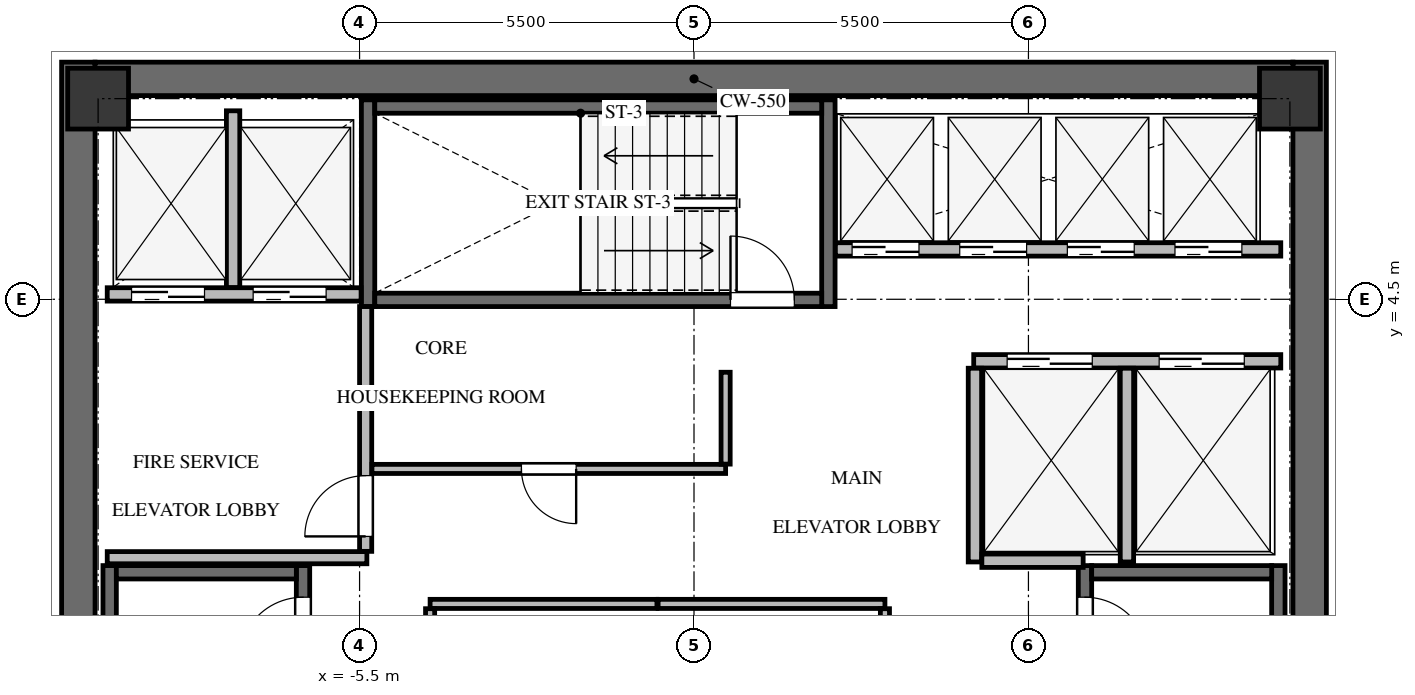
"""IFC4 building model, lengths in metres.
Left out: names, types, materials, properties, quantities, classifications, styles, units other than length and angle.
Written with IfcOpenShell. Run it as: python <this file> out.ifc"""

import sys

from ifc_helpers import new_model, si_unit, direction, frame, frame_2d, origin, origin_2d, place, context, subcontext, project, spatial, rectangle, extrude, source, transform, mapped, element, fill, save


model = new_model("IFC4")
c1 = context("Model", 3, precision=1e-05, world=origin(), true_north=direction((0.0, 1.0)))
c2 = subcontext(c1, "Body", "Model", "MODEL_VIEW")
j1 = project(units=[si_unit("LENGTHUNIT", "METRE"), si_unit("PLANEANGLEUNIT", "RADIAN")], contexts=[c1])
p1 = place(None, origin())
s1 = spatial("IfcSite", under=j1, at=p1, CompositionType="ELEMENT")
p2 = place(p1, origin())
s2 = spatial("IfcBuilding", under=s1, at=p2, CompositionType="ELEMENT")
p3 = place(p2, frame((0.0, 0.0, 224.9)))
s3 = spatial("IfcBuildingStorey", under=s2, at=p3, CompositionType="ELEMENT", Elevation=224.9)
for number, where, z_axis, x_axis in (
    (1, (-10.125, -8.4, 0.0), (0.0, 0.0, 1.0), (0.0, 1.0, 0.0)),
    (2, (10.125, -8.4, 0.0), (0.0, 0.0, 1.0), (0.0, 1.0, 0.0)),
):
    element("IfcWall", number, at=place(p3, frame(where, z_axis=z_axis, x_axis=x_axis)), inside=s3, PredefinedType="SHEAR", context=c2, shape_type="SweptSolid", body=[
        extrude(rectangle(XDim=16.8, YDim=0.55, at=frame_2d((8.4, 0.0))), origin(), (0.0, 0.0, 1.0), 3.3),
    ])
p4 = place(p3, frame((-9.85, 8.125, 0.0), z_axis=(0.0, 0.0, 1.0), x_axis=(1.0, 0.0, 0.0)))
e3 = element("IfcWall", 3, at=p4, inside=s3, PredefinedType="SHEAR", context=c2, shape_type="SweptSolid", body=[
    extrude(rectangle(XDim=19.7, YDim=0.55, at=frame_2d((9.85, 0.0))), origin(), (0.0, 0.0, 1.0), 3.3),
])
p5 = place(p3, frame((-6.43, -7.77, -0.24), z_axis=(0.0, 0.0, 1.0), x_axis=(0.0, 1.0, 0.0)))
e4 = element("IfcWall", 4, at=p5, inside=s3, PredefinedType="SHEAR", context=c2, shape_type="SweptSolid", body=[
    extrude(rectangle(XDim=7.89, YDim=0.22, at=frame_2d((3.945, 0.0))), origin(), (0.0, 0.0, 1.0), 3.3),
])
p6 = place(p5, frame((6.32, 0.0, 0.0)))
e5 = element("IfcOpeningElement", 5, at=p6, cuts=e4, PredefinedType="OPENING", context=c2, shape_type="SweptSolid", body=[
    extrude(rectangle(XDim=1.05, YDim=2.15, at=frame_2d((0.525, 1.075))), frame((0.0, 0.12, 0.0), z_axis=(0.0, -1.0, 0.0), x_axis=(1.0, 0.0, 0.0)), (0.0, 0.0, 1.0), 0.24),
])
p7 = place(p3, frame((-9.61, 0.12, -0.24), z_axis=(0.0, 0.0, 1.0), x_axis=(0.0, -1.0, 0.0)))
e6 = element("IfcWall", 6, at=p7, inside=s3, PredefinedType="SHEAR", context=c2, shape_type="SweptSolid", body=[
    extrude(rectangle(XDim=7.89, YDim=0.22, at=frame_2d((3.945, 0.0))), origin(), (0.0, 0.0, 1.0), 3.3),
])
p8 = place(p3, frame((-6.54, 0.01, -0.24), z_axis=(0.0, 0.0, 1.0), x_axis=(-1.0, 0.0, 0.0)))
e7 = element("IfcWall", 7, at=p8, inside=s3, PredefinedType="SHEAR", context=c2, shape_type="SweptSolid", body=[
    extrude(rectangle(XDim=2.96, YDim=0.22, at=frame_2d((1.48, 0.0))), origin(), (0.0, 0.0, 1.0), 3.3),
])
p9 = place(p3, frame((9.61, -7.77, -0.24), z_axis=(0.0, 0.0, 1.0), x_axis=(0.0, 1.0, 0.0)))
e8 = element("IfcWall", 8, at=p9, inside=s3, PredefinedType="SHEAR", context=c2, shape_type="SweptSolid", body=[
    extrude(rectangle(XDim=7.89, YDim=0.22, at=frame_2d((3.945, 0.0))), origin(), (0.0, 0.0, 1.0), 3.3),
])
p10 = place(p3, frame((6.43, 0.12, -0.24), z_axis=(0.0, 0.0, 1.0), x_axis=(0.0, -1.0, 0.0)))
e9 = element("IfcWall", 9, at=p10, inside=s3, PredefinedType="SHEAR", context=c2, shape_type="SweptSolid", body=[
    extrude(rectangle(XDim=7.89, YDim=0.22, at=frame_2d((3.945, 0.0))), origin(), (0.0, 0.0, 1.0), 3.3),
])
p11 = place(p10, frame((0.52, 0.0, 0.0)))
e10 = element("IfcOpeningElement", 10, at=p11, cuts=e9, PredefinedType="OPENING", context=c2, shape_type="SweptSolid", body=[
    extrude(rectangle(XDim=1.05, YDim=2.15, at=frame_2d((0.525, 1.075))), frame((0.0, 0.12, 0.0), z_axis=(0.0, -1.0, 0.0), x_axis=(1.0, 0.0, 0.0)), (0.0, 0.0, 1.0), 0.24),
])
p12 = place(p3, frame((9.5, 0.01, -0.24), z_axis=(0.0, 0.0, 1.0), x_axis=(-1.0, 0.0, 0.0)))
e11 = element("IfcWall", 11, at=p12, inside=s3, PredefinedType="SHEAR", context=c2, shape_type="SweptSolid", body=[
    extrude(rectangle(XDim=2.96, YDim=0.22, at=frame_2d((1.48, 0.0))), origin(), (0.0, 0.0, 1.0), 3.3),
])
for number, where, z_axis, x_axis in (
    (12, (2.21, 4.38, -0.24), (0.0, 0.0, 1.0), (0.0, 1.0, 0.0)),
    (13, (-5.36, 7.78, -0.24), (0.0, 0.0, 1.0), (0.0, -1.0, 0.0)),
):
    element("IfcWall", number, at=place(p3, frame(where, z_axis=z_axis, x_axis=x_axis)), inside=s3, PredefinedType="SHEAR", context=c2, shape_type="SweptSolid", body=[
        extrude(rectangle(XDim=3.4, YDim=0.22, at=frame_2d((1.7, 0.0))), origin(), (0.0, 0.0, 1.0), 3.3),
    ])
p13 = place(p3, frame((-5.25, 4.49, -0.24), z_axis=(0.0, 0.0, 1.0), x_axis=(1.0, 0.0, 0.0)))
e14 = element("IfcWall", 14, at=p13, inside=s3, PredefinedType="SHEAR", context=c2, shape_type="SweptSolid", body=[
    extrude(rectangle(XDim=7.35, YDim=0.22, at=frame_2d((3.675, 0.0))), origin(), (0.0, 0.0, 1.0), 3.3),
])
p14 = place(p13, frame((5.85, 0.0, 0.0)))
e15 = element("IfcOpeningElement", 15, at=p14, cuts=e14, PredefinedType="OPENING", context=c2, shape_type="SweptSolid", body=[
    extrude(rectangle(XDim=1.05, YDim=2.15, at=frame_2d((0.525, 1.075))), frame((0.0, 0.12, 0.0), z_axis=(0.0, -1.0, 0.0), x_axis=(1.0, 0.0, 0.0)), (0.0, 0.0, 1.0), 0.24),
])
p15 = place(p3, frame((2.1, 7.67, -0.24), z_axis=(0.0, 0.0, 1.0), x_axis=(-1.0, 0.0, 0.0)))
e16 = element("IfcWall", 16, at=p15, inside=s3, PredefinedType="SHEAR", context=c2, shape_type="SweptSolid", body=[
    extrude(rectangle(XDim=7.35, YDim=0.22, at=frame_2d((3.675, 0.0))), origin(), (0.0, 0.0, 1.0), 3.3),
])
m1 = source(origin(), c2, "Body", "SweptSolid", [
    extrude(rectangle(XDim=1.0, YDim=1.0, at=origin_2d()), origin(), (0.0, 0.0, 1.0), 3.3),
])
for number, where, z_axis, x_axis in (
    (17, (9.8, 7.8, -0.24), (0.0, 0.0, 1.0), (1.0, 0.0, 0.0)),
    (18, (-9.8, 7.8, -0.24), (0.0, 0.0, 1.0), (1.0, 0.0, 0.0)),
):
    element("IfcColumn", number, at=place(p3, frame(where, z_axis=z_axis, x_axis=x_axis)), inside=s3, PredefinedType="COLUMN", context=c2, shape_type="MappedRepresentation", body=[
        mapped(m1, transform((0.0, 0.0, 0.0), x_axis=(1.0, 0.0, 0.0), y_axis=(0.0, 1.0, 0.0), z_axis=(0.0, 0.0, 1.0), scale=1.0)),
    ])
p16 = place(p3, frame((-9.65, 4.58, 0.0), z_axis=(0.0, 0.0, 1.0), x_axis=(1.0, 0.0, 0.0)))
e19 = element("IfcWall", 19, at=p16, inside=s3, PredefinedType="SOLIDWALL", context=c2, shape_type="SweptSolid", body=[
    extrude(rectangle(XDim=4.175, YDim=0.22, at=frame_2d((2.087, 0.0))), origin(), (0.0, 0.0, 1.0), 3.045),
])
p17 = place(p16, frame((0.4, 0.0, 0.0)))
e20 = element("IfcOpeningElement", 20, at=p17, cuts=e19, PredefinedType="OPENING", context=c2, shape_type="SweptSolid", body=[
    extrude(rectangle(XDim=1.2, YDim=2.15, at=frame_2d((0.6, 1.075))), frame((0.0, 0.12, 0.0), z_axis=(0.0, -1.0, 0.0), x_axis=(1.0, 0.0, 0.0)), (0.0, 0.0, 1.0), 0.24),
])
p18 = place(p16, frame((2.4, 0.0, 0.0)))
e21 = element("IfcOpeningElement", 21, at=p18, cuts=e19, PredefinedType="OPENING", context=c2, shape_type="SweptSolid", body=[
    extrude(rectangle(XDim=1.2, YDim=2.15, at=frame_2d((0.6, 1.075))), frame((0.0, 0.12, 0.0), z_axis=(0.0, -1.0, 0.0), x_axis=(1.0, 0.0, 0.0)), (0.0, 0.0, 1.0), 0.24),
])
p19 = place(p3, frame((-7.58, 4.694, 0.0), z_axis=(0.0, 0.0, 1.0), x_axis=(0.0, 1.0, 0.0)))
e22 = element("IfcWall", 22, at=p19, inside=s3, PredefinedType="SOLIDWALL", context=c2, shape_type="SweptSolid", body=[
    extrude(rectangle(XDim=2.906, YDim=0.22, at=frame_2d((1.453, 0.0))), origin(), (0.0, 0.0, 1.0), 3.045),
])
p20 = place(p3, frame((-9.65, 0.25, 0.0), z_axis=(0.0, 0.0, 1.0), x_axis=(1.0, 0.0, 0.0)))
e23 = element("IfcWall", 23, at=p20, inside=s3, PredefinedType="SOLIDWALL", context=c2, shape_type="SweptSolid", body=[
    extrude(rectangle(XDim=4.27, YDim=0.2, at=frame_2d((2.135, 0.0))), origin(), (0.0, 0.0, 1.0), 3.045),
])
p21 = place(p3, frame((-5.4, 0.354, 0.0), z_axis=(0.0, 0.0, 1.0), x_axis=(0.0, 1.0, 0.0)))
e24 = element("IfcWall", 24, at=p21, inside=s3, PredefinedType="SOLIDWALL", context=c2, shape_type="SweptSolid", body=[
    extrude(rectangle(XDim=4.026, YDim=0.2, at=frame_2d((2.013, 0.0))), origin(), (0.0, 0.0, 1.0), 3.045),
])
p22 = place(p21, frame((0.246, 0.0, 0.0)))
e25 = element("IfcOpeningElement", 25, at=p22, cuts=e24, PredefinedType="OPENING", context=c2, shape_type="SweptSolid", body=[
    extrude(rectangle(XDim=1.0, YDim=2.15, at=frame_2d((0.5, 1.075))), frame((0.0, 0.11, 0.0), z_axis=(0.0, -1.0, 0.0), x_axis=(1.0, 0.0, 0.0)), (0.0, 0.0, 1.0), 0.22),
])
p23 = place(p3, frame((4.6, 3.48, 0.0), z_axis=(0.0, 0.0, 1.0), x_axis=(1.0, 0.0, 0.0)))
e26 = element("IfcWall", 26, at=p23, inside=s3, PredefinedType="SOLIDWALL", context=c2, shape_type="SweptSolid", body=[
    extrude(rectangle(XDim=5.05, YDim=0.22, at=frame_2d((2.525, 0.0))), origin(), (0.0, 0.0, 1.0), 3.045),
])
p24 = place(p23, frame((0.55, 0.0, 0.0)))
e27 = element("IfcOpeningElement", 27, at=p24, cuts=e26, PredefinedType="OPENING", context=c2, shape_type="SweptSolid", body=[
    extrude(rectangle(XDim=1.4, YDim=2.15, at=frame_2d((0.7, 1.075))), frame((0.0, 0.12, 0.0), z_axis=(0.0, -1.0, 0.0), x_axis=(1.0, 0.0, 0.0)), (0.0, 0.0, 1.0), 0.24),
])
p25 = place(p23, frame((3.05, 0.0, 0.0)))
e28 = element("IfcOpeningElement", 28, at=p25, cuts=e26, PredefinedType="OPENING", context=c2, shape_type="SweptSolid", body=[
    extrude(rectangle(XDim=1.4, YDim=2.15, at=frame_2d((0.7, 1.075))), frame((0.0, 0.12, 0.0), z_axis=(0.0, -1.0, 0.0), x_axis=(1.0, 0.0, 0.0)), (0.0, 0.0, 1.0), 0.24),
])
for number, where, z_axis, x_axis in (
    (29, (4.62, 0.18, 0.0), (0.0, 0.0, 1.0), (0.0, 1.0, 0.0)),
    (30, (7.12, 0.18, 0.0), (0.0, 0.0, 1.0), (0.0, 1.0, 0.0)),
):
    element("IfcWall", number, at=place(p3, frame(where, z_axis=z_axis, x_axis=x_axis)), inside=s3, PredefinedType="SOLIDWALL", context=c2, shape_type="SweptSolid", body=[
        extrude(rectangle(XDim=3.186, YDim=0.22, at=frame_2d((1.593, 0.0))), origin(), (0.0, 0.0, 1.0), 3.045),
    ])
p26 = place(p3, frame((4.734, 0.2, 0.0), z_axis=(0.0, 0.0, 1.0), x_axis=(1.0, 0.0, 0.0)))
e31 = element("IfcWall", 31, at=p26, inside=s3, PredefinedType="SOLIDWALL", context=c2, shape_type="SweptSolid", body=[
    extrude(rectangle(XDim=1.666, YDim=0.22, at=frame_2d((0.833, 0.0))), origin(), (0.0, 0.0, 1.0), 3.045),
])
p27 = place(p3, frame((2.325, 5.32, 0.0), z_axis=(0.0, 0.0, 1.0), x_axis=(1.0, 0.0, 0.0)))
e32 = element("IfcWall", 32, at=p27, inside=s3, PredefinedType="SOLIDWALL", context=c2, shape_type="SweptSolid", body=[
    extrude(rectangle(XDim=7.325, YDim=0.22, at=frame_2d((3.663, 0.0))), origin(), (0.0, 0.0, 1.0), 3.045),
])
p28 = place(p27, frame((0.275, 0.0, 0.0)))
e33 = element("IfcOpeningElement", 33, at=p28, cuts=e32, PredefinedType="OPENING", context=c2, shape_type="SweptSolid", body=[
    extrude(rectangle(XDim=1.1, YDim=2.15, at=frame_2d((0.55, 1.075))), frame((0.0, 0.12, 0.0), z_axis=(0.0, -1.0, 0.0), x_axis=(1.0, 0.0, 0.0)), (0.0, 0.0, 1.0), 0.24),
])
p29 = place(p27, frame((2.045, 0.0, 0.0)))
e34 = element("IfcOpeningElement", 34, at=p29, cuts=e32, PredefinedType="OPENING", context=c2, shape_type="SweptSolid", body=[
    extrude(rectangle(XDim=1.1, YDim=2.15, at=frame_2d((0.55, 1.075))), frame((0.0, 0.12, 0.0), z_axis=(0.0, -1.0, 0.0), x_axis=(1.0, 0.0, 0.0)), (0.0, 0.0, 1.0), 0.24),
])
p30 = place(p27, frame((3.815, 0.0, 0.0)))
e35 = element("IfcOpeningElement", 35, at=p30, cuts=e32, PredefinedType="OPENING", context=c2, shape_type="SweptSolid", body=[
    extrude(rectangle(XDim=1.1, YDim=2.15, at=frame_2d((0.55, 1.075))), frame((0.0, 0.12, 0.0), z_axis=(0.0, -1.0, 0.0), x_axis=(1.0, 0.0, 0.0)), (0.0, 0.0, 1.0), 0.24),
])
p31 = place(p27, frame((5.585, 0.0, 0.0)))
e36 = element("IfcOpeningElement", 36, at=p31, cuts=e32, PredefinedType="OPENING", context=c2, shape_type="SweptSolid", body=[
    extrude(rectangle(XDim=1.1, YDim=2.15, at=frame_2d((0.55, 1.075))), frame((0.0, 0.12, 0.0), z_axis=(0.0, -1.0, 0.0), x_axis=(1.0, 0.0, 0.0)), (0.0, 0.0, 1.0), 0.24),
])
p32 = place(p3, frame((-4.34, -0.51, 0.0), z_axis=(0.0, 0.0, 1.0), x_axis=(1.0, 0.0, 0.0)))
e37 = element("IfcWall", 37, at=p32, inside=s3, PredefinedType="PARTITIONING", context=c2, shape_type="SweptSolid", body=[
    extrude(rectangle(XDim=3.73, YDim=0.15, at=frame_2d((1.865, 0.0))), origin(), (0.0, 0.0, 1.0), 3.045),
])
p33 = place(p3, frame((-4.34, -2.961, 0.0), z_axis=(0.0, 0.0, 1.0), x_axis=(0.0, 1.0, 0.0)))
e38 = element("IfcWall", 38, at=p33, inside=s3, PredefinedType="PARTITIONING", context=c2, shape_type="SweptSolid", body=[
    extrude(rectangle(XDim=2.372, YDim=0.15, at=frame_2d((1.186, 0.0))), origin(), (0.0, 0.0, 1.0), 3.045),
])
p34 = place(p3, frame((-0.59, -0.51, 0.0), z_axis=(0.0, 0.0, 1.0), x_axis=(1.0, 0.0, 0.0)))
e39 = element("IfcWall", 39, at=p34, inside=s3, PredefinedType="PARTITIONING", context=c2, shape_type="SweptSolid", body=[
    extrude(rectangle(XDim=3.73, YDim=0.15, at=frame_2d((1.865, 0.0))), origin(), (0.0, 0.0, 1.0), 3.045),
])
p35 = place(p3, frame((3.14, -0.589, 0.0), z_axis=(0.0, 0.0, 1.0), x_axis=(0.0, -1.0, 0.0)))
e40 = element("IfcWall", 40, at=p35, inside=s3, PredefinedType="PARTITIONING", context=c2, shape_type="SweptSolid", body=[
    extrude(rectangle(XDim=2.372, YDim=0.15, at=frame_2d((1.186, 0.0))), origin(), (0.0, 0.0, 1.0), 3.045),
])
p36 = place(p3, frame((0.52, 1.71, 0.0), z_axis=(0.0, 0.0, 1.0), x_axis=(-1.0, 0.0, 0.0)))
e41 = element("IfcWall", 41, at=p36, inside=s3, PredefinedType="PARTITIONING", context=c2, shape_type="SweptSolid", body=[
    extrude(rectangle(XDim=5.816, YDim=0.15, at=frame_2d((2.908, 0.0))), origin(), (0.0, 0.0, 1.0), 3.045),
])
p37 = place(p36, frame((2.458, 0.0, 0.0)))
e42 = element("IfcOpeningElement", 42, at=p37, cuts=e41, PredefinedType="OPENING", context=c2, shape_type="SweptSolid", body=[
    extrude(rectangle(XDim=0.9, YDim=2.05, at=frame_2d((0.45, 1.025))), frame((0.0, 0.085, 0.0), z_axis=(0.0, -1.0, 0.0), x_axis=(1.0, 0.0, 0.0)), (0.0, 0.0, 1.0), 0.17),
])
p38 = place(p3, frame((0.52, 3.3, 0.0), z_axis=(0.0, 0.0, 1.0), x_axis=(0.0, -1.0, 0.0)))
e43 = element("IfcWall", 43, at=p38, inside=s3, PredefinedType="PARTITIONING", context=c2, shape_type="SweptSolid", body=[
    extrude(rectangle(XDim=1.511, YDim=0.15, at=frame_2d((0.755, 0.0))), origin(), (0.0, 0.0, 1.0), 3.045),
])
m2 = source(origin(), c2, "Body", "SweptSolid", [
    extrude(rectangle(XDim=1.05, YDim=2.15, at=frame_2d((0.525, 1.075))), frame((0.0, 0.025, 0.0), z_axis=(0.0, -1.0, 0.0), x_axis=(1.0, 0.0, 0.0)), (0.0, 0.0, 1.0), 0.05),
])
p39 = place(p6, origin())
e44 = element("IfcDoor", 44, at=p39, inside=s3, OperationType="SINGLE_SWING_LEFT", PredefinedType="DOOR", context=c2, shape_type="MappedRepresentation", body=[
    mapped(m2, transform((0.0, 0.0, 0.0), x_axis=(1.0, 0.0, 0.0), y_axis=(0.0, 1.0, 0.0), z_axis=(0.0, 0.0, 1.0), scale=1.0)),
])
fill(e5, e44)
m3 = source(origin(), c2, "Body", "SweptSolid", [
    extrude(rectangle(XDim=1.05, YDim=2.15, at=frame_2d((0.525, 1.075))), frame((0.0, 0.025, 0.0), z_axis=(0.0, -1.0, 0.0), x_axis=(1.0, 0.0, 0.0)), (0.0, 0.0, 1.0), 0.05),
])
p40 = place(p11, origin())
e45 = element("IfcDoor", 45, at=p40, inside=s3, OperationType="SINGLE_SWING_RIGHT", PredefinedType="DOOR", context=c2, shape_type="MappedRepresentation", body=[
    mapped(m3, transform((0.0, 0.0, 0.0), x_axis=(1.0, 0.0, 0.0), y_axis=(0.0, 1.0, 0.0), z_axis=(0.0, 0.0, 1.0), scale=1.0)),
])
fill(e10, e45)
p41 = place(p14, origin())
e46 = element("IfcDoor", 46, at=p41, inside=s3, OperationType="SINGLE_SWING_LEFT", PredefinedType="DOOR", context=c2, shape_type="MappedRepresentation", body=[
    mapped(m2, transform((0.0, 0.0, 0.0), x_axis=(1.0, 0.0, 0.0), y_axis=(0.0, 1.0, 0.0), z_axis=(0.0, 0.0, 1.0), scale=1.0)),
])
fill(e15, e46)
m4 = source(origin(), c2, "Body", "SweptSolid", [
    extrude(rectangle(XDim=1.2, YDim=2.15, at=frame_2d((0.6, 1.075))), frame((0.0, 0.025, 0.0), z_axis=(0.0, -1.0, 0.0), x_axis=(1.0, 0.0, 0.0)), (0.0, 0.0, 1.0), 0.05),
])
p42 = place(p17, origin())
e47 = element("IfcDoor", 47, at=p42, inside=s3, OperationType="DOUBLE_DOOR_SLIDING", PredefinedType="DOOR", context=c2, shape_type="MappedRepresentation", body=[
    mapped(m4, transform((0.0, 0.0, 0.0), x_axis=(1.0, 0.0, 0.0), y_axis=(0.0, 1.0, 0.0), z_axis=(0.0, 0.0, 1.0), scale=1.0)),
])
fill(e20, e47)
p43 = place(p18, origin())
e48 = element("IfcDoor", 48, at=p43, inside=s3, OperationType="DOUBLE_DOOR_SLIDING", PredefinedType="DOOR", context=c2, shape_type="MappedRepresentation", body=[
    mapped(m4, transform((0.0, 0.0, 0.0), x_axis=(1.0, 0.0, 0.0), y_axis=(0.0, 1.0, 0.0), z_axis=(0.0, 0.0, 1.0), scale=1.0)),
])
fill(e21, e48)
m5 = source(origin(), c2, "Body", "SweptSolid", [
    extrude(rectangle(XDim=1.0, YDim=2.15, at=frame_2d((0.5, 1.075))), frame((0.0, 0.025, 0.0), z_axis=(0.0, -1.0, 0.0), x_axis=(1.0, 0.0, 0.0)), (0.0, 0.0, 1.0), 0.05),
])
p44 = place(p22, origin())
e49 = element("IfcDoor", 49, at=p44, inside=s3, OperationType="SINGLE_SWING_LEFT", PredefinedType="DOOR", context=c2, shape_type="MappedRepresentation", body=[
    mapped(m5, transform((0.0, 0.0, 0.0), x_axis=(1.0, 0.0, 0.0), y_axis=(0.0, 1.0, 0.0), z_axis=(0.0, 0.0, 1.0), scale=1.0)),
])
fill(e25, e49)
m6 = source(origin(), c2, "Body", "SweptSolid", [
    extrude(rectangle(XDim=1.4, YDim=2.15, at=frame_2d((0.7, 1.075))), frame((0.0, 0.025, 0.0), z_axis=(0.0, -1.0, 0.0), x_axis=(1.0, 0.0, 0.0)), (0.0, 0.0, 1.0), 0.05),
])
p45 = place(p24, origin())
e50 = element("IfcDoor", 50, at=p45, inside=s3, OperationType="DOUBLE_DOOR_SLIDING", PredefinedType="DOOR", context=c2, shape_type="MappedRepresentation", body=[
    mapped(m6, transform((0.0, 0.0, 0.0), x_axis=(1.0, 0.0, 0.0), y_axis=(0.0, 1.0, 0.0), z_axis=(0.0, 0.0, 1.0), scale=1.0)),
])
fill(e27, e50)
p46 = place(p25, origin())
e51 = element("IfcDoor", 51, at=p46, inside=s3, OperationType="DOUBLE_DOOR_SLIDING", PredefinedType="DOOR", context=c2, shape_type="MappedRepresentation", body=[
    mapped(m6, transform((0.0, 0.0, 0.0), x_axis=(1.0, 0.0, 0.0), y_axis=(0.0, 1.0, 0.0), z_axis=(0.0, 0.0, 1.0), scale=1.0)),
])
fill(e28, e51)
m7 = source(origin(), c2, "Body", "SweptSolid", [
    extrude(rectangle(XDim=1.1, YDim=2.15, at=frame_2d((0.55, 1.075))), frame((0.0, 0.025, 0.0), z_axis=(0.0, -1.0, 0.0), x_axis=(1.0, 0.0, 0.0)), (0.0, 0.0, 1.0), 0.05),
])
p47 = place(p28, origin())
e52 = element("IfcDoor", 52, at=p47, inside=s3, OperationType="DOUBLE_DOOR_SLIDING", PredefinedType="DOOR", context=c2, shape_type="MappedRepresentation", body=[
    mapped(m7, transform((0.0, 0.0, 0.0), x_axis=(1.0, 0.0, 0.0), y_axis=(0.0, 1.0, 0.0), z_axis=(0.0, 0.0, 1.0), scale=1.0)),
])
fill(e33, e52)
p48 = place(p29, origin())
e53 = element("IfcDoor", 53, at=p48, inside=s3, OperationType="DOUBLE_DOOR_SLIDING", PredefinedType="DOOR", context=c2, shape_type="MappedRepresentation", body=[
    mapped(m7, transform((0.0, 0.0, 0.0), x_axis=(1.0, 0.0, 0.0), y_axis=(0.0, 1.0, 0.0), z_axis=(0.0, 0.0, 1.0), scale=1.0)),
])
fill(e34, e53)
p49 = place(p30, origin())
e54 = element("IfcDoor", 54, at=p49, inside=s3, OperationType="DOUBLE_DOOR_SLIDING", PredefinedType="DOOR", context=c2, shape_type="MappedRepresentation", body=[
    mapped(m7, transform((0.0, 0.0, 0.0), x_axis=(1.0, 0.0, 0.0), y_axis=(0.0, 1.0, 0.0), z_axis=(0.0, 0.0, 1.0), scale=1.0)),
])
fill(e35, e54)
p50 = place(p31, origin())
e55 = element("IfcDoor", 55, at=p50, inside=s3, OperationType="DOUBLE_DOOR_SLIDING", PredefinedType="DOOR", context=c2, shape_type="MappedRepresentation", body=[
    mapped(m7, transform((0.0, 0.0, 0.0), x_axis=(1.0, 0.0, 0.0), y_axis=(0.0, 1.0, 0.0), z_axis=(0.0, 0.0, 1.0), scale=1.0)),
])
fill(e36, e55)
m8 = source(origin(), c2, "Body", "SweptSolid", [
    extrude(rectangle(XDim=0.9, YDim=2.05, at=frame_2d((0.45, 1.025))), frame((0.0, 0.025, 0.0), z_axis=(0.0, -1.0, 0.0), x_axis=(1.0, 0.0, 0.0)), (0.0, 0.0, 1.0), 0.05),
])
p51 = place(p37, origin())
e56 = element("IfcDoor", 56, at=p51, inside=s3, OperationType="SINGLE_SWING_LEFT", PredefinedType="DOOR", context=c2, shape_type="MappedRepresentation", body=[
    mapped(m8, transform((0.0, 0.0, 0.0), x_axis=(1.0, 0.0, 0.0), y_axis=(0.0, 1.0, 0.0), z_axis=(0.0, 0.0, 1.0), scale=1.0)),
])
fill(e42, e56)
save(model, sys.argv[1])
